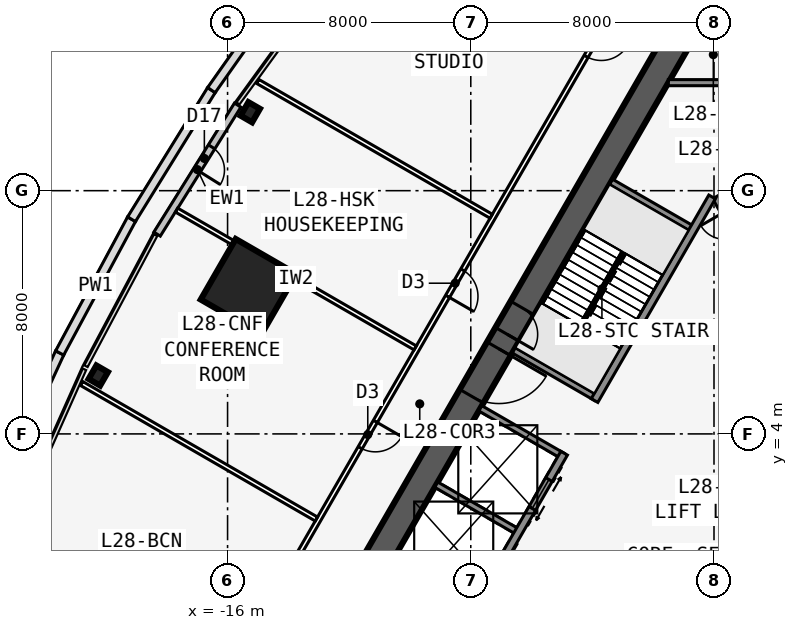
"""IFC4 building model, lengths in metres.
Left out: names, types, materials, properties, quantities, classifications, styles, units other than length and angle.
Written with IfcOpenShell. Run it as: python <this file> out.ifc"""

import sys

from ifc_helpers import new_model, si_unit, direction, frame, frame_2d, origin, origin_2d, place, context, subcontext, project, spatial, rectangle, i_section, extrude, element, fill, save


model = new_model("IFC4")
c1 = context("Model", 3, precision=1e-05, world=origin(), true_north=direction((0.0, 1.0)))
c2 = subcontext(c1, "Body", "Model", "MODEL_VIEW")
j1 = project(units=[si_unit("LENGTHUNIT", "METRE"), si_unit("PLANEANGLEUNIT", "RADIAN")], contexts=[c1])
p1 = place(None, origin())
s1 = spatial("IfcSite", under=j1, at=p1, CompositionType="ELEMENT")
p2 = place(p1, origin())
s2 = spatial("IfcBuilding", under=s1, at=p2, CompositionType="ELEMENT")
p3 = place(p2, frame((0.0, 0.0, 109.7)))
s3 = spatial("IfcBuildingStorey", under=s2, at=p3, CompositionType="ELEMENT", Elevation=109.7)
p4 = place(p3, frame((16.5, -9.526, 0.0), z_axis=(0.0, 0.0, 1.0), x_axis=(-0.499999749417, 0.866025548458, 0.0)))
e1 = element("IfcWall", 1, at=p4, inside=s3, PredefinedType="SHEAR", context=c2, shape_type="SweptSolid", body=[
    extrude(rectangle(XDim=33.0, YDim=0.9, at=frame_2d((16.5, 0.0))), origin(), (0.0, 0.0, 1.0), 5.0),
])
p5 = place(p4, frame((14.15, 0.0, 0.0)))
e2 = element("IfcOpeningElement", 2, at=p5, cuts=e1, PredefinedType="OPENING", context=c2, shape_type="SweptSolid", body=[
    extrude(rectangle(XDim=1.8, YDim=2.13, at=frame_2d((0.9, 1.065))), frame((0.0, 0.46, 0.0), z_axis=(0.0, -1.0, 0.0), x_axis=(1.0, 0.0, 0.0)), (0.0, 0.0, 1.0), 0.92),
])
p6 = place(p4, frame((12.6, 0.0, 0.0)))
e3 = element("IfcOpeningElement", 3, at=p6, cuts=e1, PredefinedType="OPENING", context=c2, shape_type="SweptSolid", body=[
    extrude(rectangle(XDim=1.0, YDim=2.13, at=frame_2d((0.5, 1.065))), frame((0.0, 0.46, 0.0), z_axis=(0.0, -1.0, 0.0), x_axis=(1.0, 0.0, 0.0)), (0.0, 0.0, 1.0), 0.92),
])
p7 = place(p3, frame((5.379, 2.586, 0.0), z_axis=(0.0, 0.0, 1.0), x_axis=(-0.500001375892, 0.866024609411, 0.0)))
e4 = element("IfcWall", 4, at=p7, inside=s3, PredefinedType="SOLIDWALL", context=c2, shape_type="SweptSolid", body=[
    extrude(rectangle(XDim=10.633, YDim=0.25, at=frame_2d((5.316, 0.0))), origin(), (0.0, 0.0, 1.0), 4.835),
])
p8 = place(p7, frame((9.164, 0.0, 0.0)))
e5 = element("IfcOpeningElement", 5, at=p8, cuts=e4, PredefinedType="OPENING", context=c2, shape_type="SweptSolid", body=[
    extrude(rectangle(XDim=0.9, YDim=2.13, at=frame_2d((0.45, 1.065))), frame((0.0, 0.135, 0.0), z_axis=(0.0, -1.0, 0.0), x_axis=(1.0, 0.0, 0.0)), (0.0, 0.0, 1.0), 0.27),
])
p9 = place(p7, frame((1.0, 0.0, 0.0)))
e6 = element("IfcOpeningElement", 6, at=p9, cuts=e4, PredefinedType="OPENING", context=c2, shape_type="SweptSolid", body=[
    extrude(rectangle(XDim=1.1, YDim=2.13, at=frame_2d((0.55, 1.065))), frame((0.0, 0.135, 0.0), z_axis=(0.0, -1.0, 0.0), x_axis=(1.0, 0.0, 0.0)), (0.0, 0.0, 1.0), 0.27),
])
p10 = place(p7, frame((3.9, 0.0, 0.0)))
e7 = element("IfcOpeningElement", 7, at=p10, cuts=e4, PredefinedType="OPENING", context=c2, shape_type="SweptSolid", body=[
    extrude(rectangle(XDim=1.1, YDim=2.13, at=frame_2d((0.55, 1.065))), frame((0.0, 0.135, 0.0), z_axis=(0.0, -1.0, 0.0), x_axis=(1.0, 0.0, 0.0)), (0.0, 0.0, 1.0), 0.27),
])
p11 = place(p7, frame((6.8, 0.0, 0.0)))
e8 = element("IfcOpeningElement", 8, at=p11, cuts=e4, PredefinedType="OPENING", context=c2, shape_type="SweptSolid", body=[
    extrude(rectangle(XDim=1.1, YDim=2.13, at=frame_2d((0.55, 1.065))), frame((0.0, 0.135, 0.0), z_axis=(0.0, -1.0, 0.0), x_axis=(1.0, 0.0, 0.0)), (0.0, 0.0, 1.0), 0.27),
])
p12 = place(p3, frame((0.0, 19.052, 0.0), z_axis=(0.0, 0.0, 1.0), x_axis=(-0.499999749417, -0.866025548458, 0.0)))
e9 = element("IfcWall", 9, at=p12, inside=s3, PredefinedType="SHEAR", context=c2, shape_type="SweptSolid", body=[
    extrude(rectangle(XDim=33.0, YDim=0.9, at=frame_2d((16.5, 0.0))), origin(), (0.0, 0.0, 1.0), 5.0),
])
p13 = place(p12, frame((14.15, 0.0, 0.0)))
e10 = element("IfcOpeningElement", 10, at=p13, cuts=e9, PredefinedType="OPENING", context=c2, shape_type="SweptSolid", body=[
    extrude(rectangle(XDim=1.8, YDim=2.13, at=frame_2d((0.9, 1.065))), frame((0.0, 0.46, 0.0), z_axis=(0.0, -1.0, 0.0), x_axis=(1.0, 0.0, 0.0)), (0.0, 0.0, 1.0), 0.92),
])
p14 = place(p12, frame((12.6, 0.0, 0.0)))
e11 = element("IfcOpeningElement", 11, at=p14, cuts=e9, PredefinedType="OPENING", context=c2, shape_type="SweptSolid", body=[
    extrude(rectangle(XDim=1.0, YDim=2.13, at=frame_2d((0.5, 1.065))), frame((0.0, 0.46, 0.0), z_axis=(0.0, -1.0, 0.0), x_axis=(1.0, 0.0, 0.0)), (0.0, 0.0, 1.0), 0.92),
])
p15 = place(p3, frame((-0.062, 11.794, 0.0), z_axis=(0.0, 0.0, 1.0), x_axis=(-0.500006680225, -0.86602154692, 0.0)))
e12 = element("IfcWall", 12, at=p15, inside=s3, PredefinedType="SOLIDWALL", context=c2, shape_type="SweptSolid", body=[
    extrude(rectangle(XDim=7.733, YDim=0.25, at=frame_2d((3.866, 0.0))), origin(), (0.0, 0.0, 1.0), 4.835),
])
p16 = place(p3, frame((-4.929, 3.365, 0.0), z_axis=(0.0, 0.0, 1.0), x_axis=(-0.499991433582, -0.866030349552, 0.0)))
e13 = element("IfcWall", 13, at=p16, inside=s3, PredefinedType="SOLIDWALL", context=c2, shape_type="SweptSolid", body=[
    extrude(rectangle(XDim=10.633, YDim=0.25, at=frame_2d((5.316, 0.0))), origin(), (0.0, 0.0, 1.0), 4.835),
])
p17 = place(p16, frame((9.164, 0.0, 0.0)))
e14 = element("IfcOpeningElement", 14, at=p17, cuts=e13, PredefinedType="OPENING", context=c2, shape_type="SweptSolid", body=[
    extrude(rectangle(XDim=0.9, YDim=2.13, at=frame_2d((0.45, 1.065))), frame((0.0, 0.135, 0.0), z_axis=(0.0, -1.0, 0.0), x_axis=(1.0, 0.0, 0.0)), (0.0, 0.0, 1.0), 0.27),
])
p18 = place(p16, frame((1.0, 0.0, 0.0)))
e15 = element("IfcOpeningElement", 15, at=p18, cuts=e13, PredefinedType="OPENING", context=c2, shape_type="SweptSolid", body=[
    extrude(rectangle(XDim=1.1, YDim=2.13, at=frame_2d((0.55, 1.065))), frame((0.0, 0.135, 0.0), z_axis=(0.0, -1.0, 0.0), x_axis=(1.0, 0.0, 0.0)), (0.0, 0.0, 1.0), 0.27),
])
p19 = place(p16, frame((3.9, 0.0, 0.0)))
e16 = element("IfcOpeningElement", 16, at=p19, cuts=e13, PredefinedType="OPENING", context=c2, shape_type="SweptSolid", body=[
    extrude(rectangle(XDim=1.1, YDim=2.13, at=frame_2d((0.55, 1.065))), frame((0.0, 0.135, 0.0), z_axis=(0.0, -1.0, 0.0), x_axis=(1.0, 0.0, 0.0)), (0.0, 0.0, 1.0), 0.27),
])
for number, where, z_axis, x_axis in (
    (17, (-0.679, 10.727, 0.0), (0.0, 0.0, 1.0), (-0.866, 0.5, 0.0)),
    (18, (-3.879, 5.184, 0.0), (0.0, 0.0, 1.0), (-0.866, 0.5, 0.0)),
    (19, (-4.979, 3.279, 0.0), (0.0, 0.0, 1.0), (-0.866, 0.5, 0.0)),
    (20, (-6.429, 0.767, 0.0), (0.0, 0.0, 1.0), (-0.866, 0.5, 0.0)),
):
    element("IfcWall", number, at=place(p3, frame(where, z_axis=z_axis, x_axis=x_axis)), inside=s3, PredefinedType="SOLIDWALL", context=c2, shape_type="SweptSolid", body=[
        extrude(rectangle(XDim=3.125, YDim=0.2, at=frame_2d((1.562, 0.0))), origin(), (0.0, 0.0, 1.0), 4.835),
    ])
for number, where, z_axis, x_axis in (
    (21, (-15.254, 14.58, 0.0), (0.0, 0.0, 1.0), (-0.866, 0.5, 0.0)),
    (22, (-20.254, 5.92, 0.0), (0.0, 0.0, 1.0), (-0.866, 0.5, 0.0)),
):
    element("IfcColumn", number, at=place(p3, frame(where, z_axis=z_axis, x_axis=x_axis)), inside=s3, PredefinedType="COLUMN", context=c2, shape_type="SweptSolid", body=[
        extrude(i_section(OverallWidth=0.437, OverallDepth=0.513, WebThickness=0.061, FlangeThickness=0.097, at=origin_2d()), origin(), (0.0, 0.0, 1.0), 5.0),
    ])
p20 = place(p3, frame((-15.312, 8.84, 0.0), z_axis=(0.0, 0.0, 1.0), x_axis=(-0.866025403784, 0.5, 0.0)))
e23 = element("IfcColumn", 23, at=p20, inside=s3, PredefinedType="COLUMN", context=c2, shape_type="SweptSolid", body=[
    extrude(rectangle(XDim=2.3, YDim=2.3, at=origin_2d()), origin(), (0.0, 0.0, 1.0), 5.0),
])
p21 = place(p3, frame((-15.667, 14.814, 0.0), z_axis=(0.0, 0.0, 1.0), x_axis=(-0.529990167382, -0.84800378683, 0.0)))
e24 = element("IfcWall", 24, at=p21, inside=s3, PredefinedType="STANDARD", context=c2, shape_type="SweptSolid", body=[
    extrude(rectangle(XDim=5.003, YDim=0.25, at=frame_2d((2.501, 0.0))), origin(), (0.0, 0.0, 1.0), 4.835),
])
p22 = place(p21, frame((1.618, 0.0, 0.0)))
e25 = element("IfcOpeningElement", 25, at=p22, cuts=e24, PredefinedType="OPENING", context=c2, shape_type="SweptSolid", body=[
    extrude(rectangle(XDim=0.9, YDim=2.13, at=frame_2d((0.45, 1.065))), frame((0.0, 0.135, 0.0), z_axis=(0.0, -1.0, 0.0), x_axis=(1.0, 0.0, 0.0)), (0.0, 0.0, 1.0), 0.27),
])
p23 = place(p3, frame((-23.623, 2.113, 0.0), z_axis=(0.0, 0.0, 1.0), x_axis=(0.419172470684, 0.907906625056, 0.0)))
e26 = element("IfcWall", 26, at=p23, inside=s3, PredefinedType="PARAPET", context=c2, shape_type="SweptSolid", body=[
    extrude(rectangle(XDim=5.012, YDim=0.3, at=frame_2d((2.506, 0.0))), origin(), (0.0, 0.0, 1.0), 1.1),
])
p24 = place(p3, frame((-21.522, 6.663, 0.0), z_axis=(0.0, 0.0, 1.0), x_axis=(0.473402806561, 0.880846060751, 0.0)))
e27 = element("IfcWall", 27, at=p24, inside=s3, PredefinedType="PARAPET", context=c2, shape_type="SweptSolid", body=[
    extrude(rectangle(XDim=4.993, YDim=0.3, at=frame_2d((2.497, 0.0))), origin(), (0.0, 0.0, 1.0), 1.1),
])
p25 = place(p3, frame((-19.159, 11.061, 0.0), z_axis=(0.0, 0.0, 1.0), x_axis=(0.526139147264, 0.850398493482, 0.0)))
e28 = element("IfcWall", 28, at=p25, inside=s3, PredefinedType="PARAPET", context=c2, shape_type="SweptSolid", body=[
    extrude(rectangle(XDim=4.993, YDim=0.3, at=frame_2d((2.497, 0.0))), origin(), (0.0, 0.0, 1.0), 1.1),
])
p26 = place(p3, frame((-16.531, 15.308, 0.0), z_axis=(0.0, 0.0, 1.0), x_axis=(0.576639207024, 0.816998913661, 0.0)))
e29 = element("IfcWall", 29, at=p26, inside=s3, PredefinedType="PARAPET", context=c2, shape_type="SweptSolid", body=[
    extrude(rectangle(XDim=5.012, YDim=0.3, at=frame_2d((2.506, 0.0))), origin(), (0.0, 0.0, 1.0), 1.1),
])
p27 = place(p3, frame((-0.5, 22.836, 0.0), z_axis=(0.0, 0.0, 1.0), x_axis=(-0.500001677587, -0.866024435227, 0.0)))
e30 = element("IfcWall", 30, at=p27, inside=s3, PredefinedType="PARTITIONING", context=c2, shape_type="SweptSolid", body=[
    extrude(rectangle(XDim=39.054, YDim=0.15, at=frame_2d((19.527, 0.0))), origin(), (0.0, 0.0, 1.0), 4.835),
])
p28 = place(p27, frame((6.414, 0.0, 0.0)))
e31 = element("IfcOpeningElement", 31, at=p28, cuts=e30, PredefinedType="OPENING", context=c2, shape_type="SweptSolid", body=[
    extrude(rectangle(XDim=1.0, YDim=2.13, at=frame_2d((0.5, 1.065))), frame((0.0, 0.085, 0.0), z_axis=(0.0, -1.0, 0.0), x_axis=(1.0, 0.0, 0.0)), (0.0, 0.0, 1.0), 0.17),
])
p29 = place(p27, frame((15.527, 0.0, 0.0)))
e32 = element("IfcOpeningElement", 32, at=p29, cuts=e30, PredefinedType="OPENING", context=c2, shape_type="SweptSolid", body=[
    extrude(rectangle(XDim=1.0, YDim=2.13, at=frame_2d((0.5, 1.065))), frame((0.0, 0.085, 0.0), z_axis=(0.0, -1.0, 0.0), x_axis=(1.0, 0.0, 0.0)), (0.0, 0.0, 1.0), 0.17),
])
p30 = place(p27, frame((21.277, 0.0, 0.0)))
e33 = element("IfcOpeningElement", 33, at=p30, cuts=e30, PredefinedType="OPENING", context=c2, shape_type="SweptSolid", body=[
    extrude(rectangle(XDim=1.0, YDim=2.13, at=frame_2d((0.5, 1.065))), frame((0.0, 0.085, 0.0), z_axis=(0.0, -1.0, 0.0), x_axis=(1.0, 0.0, 0.0)), (0.0, 0.0, 1.0), 0.17),
])
p31 = place(p27, frame((31.39, 0.0, 0.0)))
e34 = element("IfcOpeningElement", 34, at=p31, cuts=e30, PredefinedType="OPENING", context=c2, shape_type="SweptSolid", body=[
    extrude(rectangle(XDim=1.0, YDim=2.13, at=frame_2d((0.5, 1.065))), frame((0.0, 0.085, 0.0), z_axis=(0.0, -1.0, 0.0), x_axis=(1.0, 0.0, 0.0)), (0.0, 0.0, 1.0), 0.17),
])
p32 = place(p3, frame((-7.329, 11.159, 0.0), z_axis=(0.0, 0.0, 1.0), x_axis=(-0.866024615734, 0.50000136494, 0.0)))
e35 = element("IfcWall", 35, at=p32, inside=s3, PredefinedType="PARTITIONING", context=c2, shape_type="SweptSolid", body=[
    extrude(rectangle(XDim=8.865, YDim=0.15, at=frame_2d((4.433, 0.0))), origin(), (0.0, 0.0, 1.0), 4.835),
])
p33 = place(p3, frame((-9.829, 6.829, 0.0), z_axis=(0.0, 0.0, 1.0), x_axis=(-0.86601827145, 0.500012353362, 0.0)))
e36 = element("IfcWall", 36, at=p33, inside=s3, PredefinedType="PARTITIONING", context=c2, shape_type="SweptSolid", body=[
    extrude(rectangle(XDim=9.064, YDim=0.15, at=frame_2d((4.532, 0.0))), origin(), (0.0, 0.0, 1.0), 4.835),
])
p34 = place(p3, frame((-13.079, 1.2, 0.0), z_axis=(0.0, 0.0, 1.0), x_axis=(-0.866017355174, 0.500013940344, 0.0)))
e37 = element("IfcWall", 37, at=p34, inside=s3, PredefinedType="PARTITIONING", context=c2, shape_type="SweptSolid", body=[
    extrude(rectangle(XDim=8.918, YDim=0.15, at=frame_2d((4.459, 0.0))), origin(), (0.0, 0.0, 1.0), 4.835),
])
p35 = place(p3, frame((-1.501, 15.552, 0.0), z_axis=(0.0, 0.0, 1.0), x_axis=(1.0, 0.0, 0.0)))
e38 = element("IfcWall", 38, at=p35, inside=s3, PredefinedType="SOLIDWALL", context=c2, shape_type="SweptSolid", body=[
    extrude(rectangle(XDim=3.002, YDim=0.2, at=frame_2d((1.501, 0.0))), origin(), (0.0, 0.0, 1.0), 4.835),
])
p36 = place(p3, frame((-2.988, 9.978, 0.0), z_axis=(0.0, 0.0, 1.0), x_axis=(-0.499992232847, -0.866029888106, 0.0)))
e39 = element("IfcWall", 39, at=p36, inside=s3, PredefinedType="SOLIDWALL", context=c2, shape_type="SweptSolid", body=[
    extrude(rectangle(XDim=2.794, YDim=0.1, at=frame_2d((1.397, 0.0))), origin(), (0.0, 0.0, 1.0), 5.0),
])
p37 = place(p22, origin())
e40 = element("IfcDoor", 40, at=p37, inside=s3, OperationType="SINGLE_SWING_RIGHT", PredefinedType="DOOR", context=c2, shape_type="SweptSolid", body=[
    extrude(rectangle(XDim=0.9, YDim=2.13, at=frame_2d((0.45, 1.065))), frame((0.0, 0.025, 0.0), z_axis=(0.0, -1.0, 0.0), x_axis=(1.0, 0.0, 0.0)), (0.0, 0.0, 1.0), 0.05),
])
fill(e25, e40)
p38 = place(p28, origin())
e41 = element("IfcDoor", 41, at=p38, inside=s3, OperationType="SINGLE_SWING_LEFT", PredefinedType="DOOR", context=c2, shape_type="SweptSolid", body=[
    extrude(rectangle(XDim=1.0, YDim=2.13, at=frame_2d((0.5, 1.065))), frame((0.0, 0.025, 0.0), z_axis=(0.0, -1.0, 0.0), x_axis=(1.0, 0.0, 0.0)), (0.0, 0.0, 1.0), 0.05),
])
fill(e31, e41)
p39 = place(p29, origin())
e42 = element("IfcDoor", 42, at=p39, inside=s3, OperationType="SINGLE_SWING_RIGHT", PredefinedType="DOOR", context=c2, shape_type="SweptSolid", body=[
    extrude(rectangle(XDim=1.0, YDim=2.13, at=frame_2d((0.5, 1.065))), frame((0.0, 0.025, 0.0), z_axis=(0.0, -1.0, 0.0), x_axis=(1.0, 0.0, 0.0)), (0.0, 0.0, 1.0), 0.05),
])
fill(e32, e42)
p40 = place(p30, origin())
e43 = element("IfcDoor", 43, at=p40, inside=s3, OperationType="SINGLE_SWING_LEFT", PredefinedType="DOOR", context=c2, shape_type="SweptSolid", body=[
    extrude(rectangle(XDim=1.0, YDim=2.13, at=frame_2d((0.5, 1.065))), frame((0.0, 0.025, 0.0), z_axis=(0.0, -1.0, 0.0), x_axis=(1.0, 0.0, 0.0)), (0.0, 0.0, 1.0), 0.05),
])
fill(e33, e43)
p41 = place(p13, origin())
e44 = element("IfcDoor", 44, at=p41, inside=s3, OperationType="DOUBLE_DOOR_SINGLE_SWING", PredefinedType="DOOR", context=c2, shape_type="SweptSolid", body=[
    extrude(rectangle(XDim=1.8, YDim=2.13, at=frame_2d((0.9, 1.065))), frame((0.0, 0.025, 0.0), z_axis=(0.0, -1.0, 0.0), x_axis=(1.0, 0.0, 0.0)), (0.0, 0.0, 1.0), 0.05),
])
fill(e10, e44)
p42 = place(p14, origin())
e45 = element("IfcDoor", 45, at=p42, inside=s3, OperationType="SINGLE_SWING_RIGHT", PredefinedType="DOOR", context=c2, shape_type="SweptSolid", body=[
    extrude(rectangle(XDim=1.0, YDim=2.13, at=frame_2d((0.5, 1.065))), frame((0.0, 0.025, 0.0), z_axis=(0.0, -1.0, 0.0), x_axis=(1.0, 0.0, 0.0)), (0.0, 0.0, 1.0), 0.05),
])
fill(e11, e45)
p43 = place(p18, origin())
e46 = element("IfcDoor", 46, at=p43, inside=s3, OperationType="DOUBLE_DOOR_SLIDING", PredefinedType="USERDEFINED", context=c2, shape_type="SweptSolid", body=[
    extrude(rectangle(XDim=1.1, YDim=2.13, at=frame_2d((0.55, 1.065))), frame((0.0, 0.025, 0.0), z_axis=(0.0, -1.0, 0.0), x_axis=(1.0, 0.0, 0.0)), (0.0, 0.0, 1.0), 0.05),
])
fill(e15, e46)
save(model, sys.argv[1])
